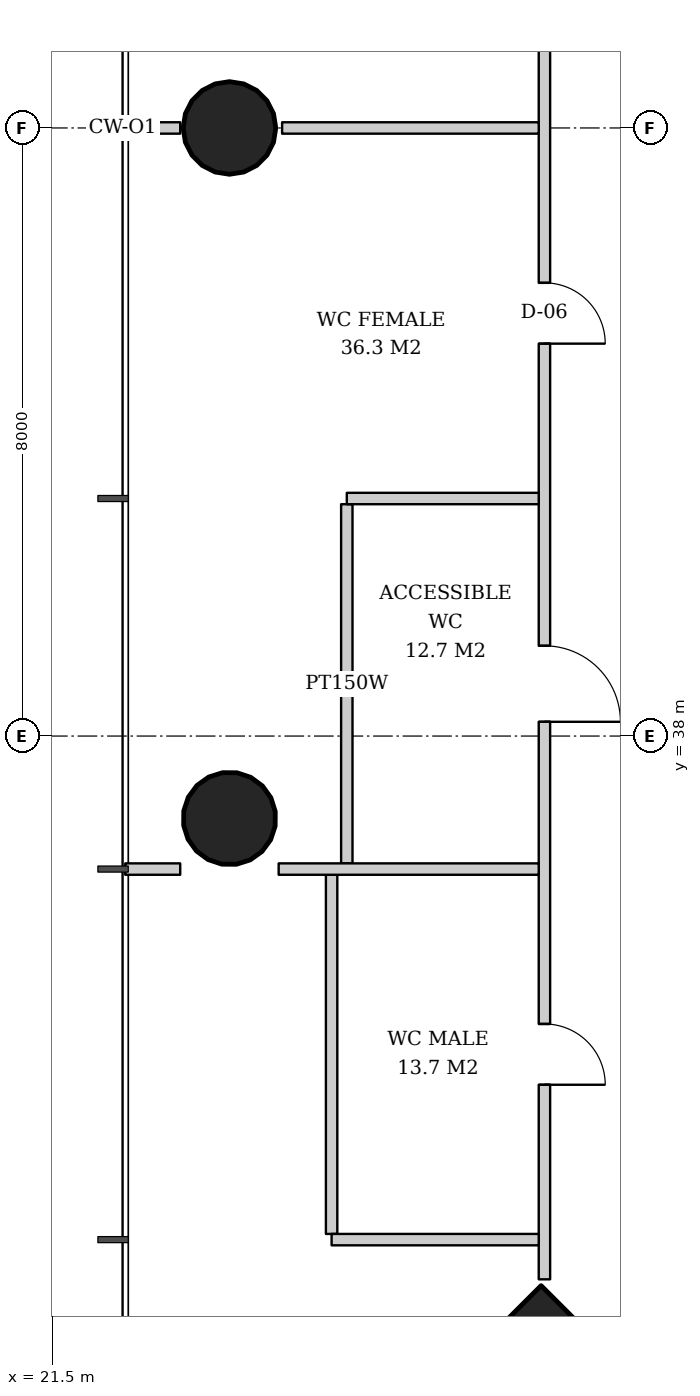
"""IFC4 building model, lengths in metres.
Left out: names, types, materials, properties, quantities, classifications, styles, units other than length and angle.
Written with IfcOpenShell. Run it as: python <this file> out.ifc"""

import sys

from ifc_helpers import new_model, si_unit, direction, frame, frame_2d, origin, origin_2d, place, context, subcontext, project, spatial, rectangle, hollow_circle, extrude, element, fill, save


model = new_model("IFC4")
c1 = context("Model", 3, precision=1e-05, world=origin(), true_north=direction((0.0, 1.0)))
c2 = subcontext(c1, "Body", "Model", "MODEL_VIEW")
j1 = project(units=[si_unit("LENGTHUNIT", "METRE"), si_unit("PLANEANGLEUNIT", "RADIAN")], contexts=[c1])
p1 = place(None, origin())
s1 = spatial("IfcSite", under=j1, at=p1, CompositionType="ELEMENT")
p2 = place(p1, origin())
s2 = spatial("IfcBuilding", under=s1, at=p2, CompositionType="ELEMENT")
p3 = place(p2, frame((0.0, 0.0, 108.4)))
s3 = spatial("IfcBuildingStorey", under=s2, at=p3, CompositionType="ELEMENT", Elevation=108.4)
p4 = place(p3, frame((27.893, 28.893, 0.0), z_axis=(0.031962158256, 0.031962158256, 0.998977898093), x_axis=(-0.707106781187, 0.707106781187, 0.0)))
e1 = element("IfcColumn", 1, at=p4, inside=s3, PredefinedType="COLUMN", context=c2, shape_type="SweptSolid", body=[
    extrude(rectangle(XDim=2.6, YDim=2.6, at=origin_2d()), origin(), (0.0, 0.0, 1.0), 3.804),
])
p5 = place(p3, frame((23.793, 46.0, 0.0), z_axis=(0.031914348339, 0.0, 0.999490607445), x_axis=(0.0, 1.0, 0.0)))
e2 = element("IfcColumn", 2, at=p5, inside=s3, PredefinedType="COLUMN", context=c2, shape_type="SweptSolid", body=[
    extrude(hollow_circle(Radius=0.61, WallThickness=0.04, at=origin_2d()), origin(), (0.0, 0.0, 1.0), 3.802),
])
p6 = place(p3, frame((23.793, 36.896, 0.0), z_axis=(0.031910302246, 0.015923048203, 0.999363892257), x_axis=(-0.446493300058, 0.894786976326, 0.0)))
e3 = element("IfcColumn", 3, at=p6, inside=s3, PredefinedType="COLUMN", context=c2, shape_type="SweptSolid", body=[
    extrude(hollow_circle(Radius=0.61, WallThickness=0.04, at=origin_2d()), origin(), (0.0, 0.0, 1.0), 3.802),
])
p7 = place(p3, frame((25.375, 41.05, 0.0), z_axis=(0.0, 0.0, 1.0), x_axis=(0.0, -1.0, 0.0)))
e4 = element("IfcWall", 4, at=p7, inside=s3, PredefinedType="PARTITIONING", context=c2, shape_type="SweptSolid", body=[
    extrude(rectangle(XDim=4.725, YDim=0.15, at=frame_2d((2.363, 0.0))), origin(), (0.0, 0.0, 1.0), 2.806),
])
p8 = place(p3, frame((25.175, 36.175, 0.0), z_axis=(0.0, 0.0, 1.0), x_axis=(0.0, -1.0, 0.0)))
e5 = element("IfcWall", 5, at=p8, inside=s3, PredefinedType="PARTITIONING", context=c2, shape_type="SweptSolid", body=[
    extrude(rectangle(XDim=4.725, YDim=0.15, at=frame_2d((2.363, 0.0))), origin(), (0.0, 0.0, 1.0), 3.62),
])
p9 = place(p3, frame((27.975, 61.147, 0.0), z_axis=(0.0, 0.0, 1.0), x_axis=(0.0, -1.0, 0.0)))
e6 = element("IfcWall", 6, at=p9, inside=s3, PredefinedType="PARTITIONING", context=c2, shape_type="SweptSolid", body=[
    extrude(rectangle(XDim=30.294, YDim=0.15, at=frame_2d((15.147, 0.0))), origin(), (0.0, 0.0, 1.0), 2.72),
])
p10 = place(p9, frame((2.46, 0.0, 0.0)))
e7 = element("IfcOpeningElement", 7, at=p10, cuts=e6, PredefinedType="OPENING", context=c2, shape_type="SweptSolid", body=[
    extrude(rectangle(XDim=1.0, YDim=2.1, at=frame_2d((0.5, 1.05))), frame((0.0, 0.085, 0.0), z_axis=(0.0, -1.0, 0.0), x_axis=(1.0, 0.0, 0.0)), (0.0, 0.0, 1.0), 0.17),
])
p11 = place(p9, frame((7.335, 0.0, 0.0)))
e8 = element("IfcOpeningElement", 8, at=p11, cuts=e6, PredefinedType="OPENING", context=c2, shape_type="SweptSolid", body=[
    extrude(rectangle(XDim=1.0, YDim=2.1, at=frame_2d((0.5, 1.05))), frame((0.0, 0.085, 0.0), z_axis=(0.0, -1.0, 0.0), x_axis=(1.0, 0.0, 0.0)), (0.0, 0.0, 1.0), 0.17),
])
p12 = place(p9, frame((12.21, 0.0, 0.0)))
e9 = element("IfcOpeningElement", 9, at=p12, cuts=e6, PredefinedType="OPENING", context=c2, shape_type="SweptSolid", body=[
    extrude(rectangle(XDim=1.0, YDim=2.1, at=frame_2d((0.5, 1.05))), frame((0.0, 0.085, 0.0), z_axis=(0.0, -1.0, 0.0), x_axis=(1.0, 0.0, 0.0)), (0.0, 0.0, 1.0), 0.17),
])
p13 = place(p9, frame((17.185, 0.0, 0.0)))
e10 = element("IfcOpeningElement", 10, at=p13, cuts=e6, PredefinedType="OPENING", context=c2, shape_type="SweptSolid", body=[
    extrude(rectangle(XDim=0.8, YDim=2.1, at=frame_2d((0.4, 1.05))), frame((0.0, 0.085, 0.0), z_axis=(0.0, -1.0, 0.0), x_axis=(1.0, 0.0, 0.0)), (0.0, 0.0, 1.0), 0.17),
])
p14 = place(p9, frame((21.96, 0.0, 0.0)))
e11 = element("IfcOpeningElement", 11, at=p14, cuts=e6, PredefinedType="OPENING", context=c2, shape_type="SweptSolid", body=[
    extrude(rectangle(XDim=1.0, YDim=2.1, at=frame_2d((0.5, 1.05))), frame((0.0, 0.085, 0.0), z_axis=(0.0, -1.0, 0.0), x_axis=(1.0, 0.0, 0.0)), (0.0, 0.0, 1.0), 0.17),
])
p15 = place(p9, frame((26.935, 0.0, 0.0)))
e12 = element("IfcOpeningElement", 12, at=p15, cuts=e6, PredefinedType="OPENING", context=c2, shape_type="SweptSolid", body=[
    extrude(rectangle(XDim=0.8, YDim=2.1, at=frame_2d((0.4, 1.05))), frame((0.0, 0.085, 0.0), z_axis=(0.0, -1.0, 0.0), x_axis=(1.0, 0.0, 0.0)), (0.0, 0.0, 1.0), 0.17),
])
p16 = place(p3, frame((27.9, 46.0, 0.0), z_axis=(0.0, 0.0, 1.0), x_axis=(-1.0, 0.0, 0.0)))
e13 = element("IfcWall", 13, at=p16, inside=s3, PredefinedType="PARTITIONING", context=c2, shape_type="SweptSolid", body=[
    extrude(rectangle(XDim=3.376, YDim=0.15, at=frame_2d((1.688, 0.0))), origin(), (0.0, 0.0, 1.0), 2.858),
])
p17 = place(p3, frame((23.183, 46.0, 0.0), z_axis=(0.0, 0.0, 1.0), x_axis=(-1.0, 0.0, 0.0)))
e14 = element("IfcWall", 14, at=p17, inside=s3, PredefinedType="PARTITIONING", context=c2, shape_type="SweptSolid", body=[
    extrude(rectangle(XDim=0.723, YDim=0.15, at=frame_2d((0.362, 0.0))), origin(), (0.0, 0.0, 1.0), 3.62),
])
p18 = place(p3, frame((27.9, 41.125, 0.0), z_axis=(0.0, 0.0, 1.0), x_axis=(-1.0, 0.0, 0.0)))
e15 = element("IfcWall", 15, at=p18, inside=s3, PredefinedType="PARTITIONING", context=c2, shape_type="SweptSolid", body=[
    extrude(rectangle(XDim=2.525, YDim=0.15, at=frame_2d((1.262, 0.0))), origin(), (0.0, 0.0, 1.0), 3.62),
])
p19 = place(p3, frame((27.9, 36.25, 0.0), z_axis=(0.0, 0.0, 1.0), x_axis=(-1.0, 0.0, 0.0)))
e16 = element("IfcWall", 16, at=p19, inside=s3, PredefinedType="PARTITIONING", context=c2, shape_type="SweptSolid", body=[
    extrude(rectangle(XDim=3.421, YDim=0.15, at=frame_2d((1.711, 0.0))), origin(), (0.0, 0.0, 1.0), 3.62),
])
p20 = place(p3, frame((23.183, 36.25, 0.0), z_axis=(0.0, 0.0, 1.0), x_axis=(-1.0, 0.0, 0.0)))
e17 = element("IfcWall", 17, at=p20, inside=s3, PredefinedType="PARTITIONING", context=c2, shape_type="SweptSolid", body=[
    extrude(rectangle(XDim=0.723, YDim=0.15, at=frame_2d((0.362, 0.0))), origin(), (0.0, 0.0, 1.0), 3.62),
])
p21 = place(p3, frame((27.9, 31.375, 0.0), z_axis=(0.0, 0.0, 1.0), x_axis=(-1.0, 0.0, 0.0)))
e18 = element("IfcWall", 18, at=p21, inside=s3, PredefinedType="PARTITIONING", context=c2, shape_type="SweptSolid", body=[
    extrude(rectangle(XDim=2.725, YDim=0.15, at=frame_2d((1.362, 0.0))), origin(), (0.0, 0.0, 1.0), 3.62),
])
p22 = place(p13, origin())
e19 = element("IfcDoor", 19, at=p22, inside=s3, OperationType="SINGLE_SWING_RIGHT", PredefinedType="DOOR", context=c2, shape_type="SweptSolid", body=[
    extrude(rectangle(XDim=0.8, YDim=2.1, at=frame_2d((0.4, 1.05))), frame((0.0, 0.025, 0.0), z_axis=(0.0, -1.0, 0.0), x_axis=(1.0, 0.0, 0.0)), (0.0, 0.0, 1.0), 0.05),
])
fill(e10, e19)
p23 = place(p14, origin())
e20 = element("IfcDoor", 20, at=p23, inside=s3, OperationType="SINGLE_SWING_RIGHT", PredefinedType="DOOR", context=c2, shape_type="SweptSolid", body=[
    extrude(rectangle(XDim=1.0, YDim=2.1, at=frame_2d((0.5, 1.05))), frame((0.0, 0.025, 0.0), z_axis=(0.0, -1.0, 0.0), x_axis=(1.0, 0.0, 0.0)), (0.0, 0.0, 1.0), 0.05),
])
fill(e11, e20)
p24 = place(p15, origin())
e21 = element("IfcDoor", 21, at=p24, inside=s3, OperationType="SINGLE_SWING_RIGHT", PredefinedType="DOOR", context=c2, shape_type="SweptSolid", body=[
    extrude(rectangle(XDim=0.8, YDim=2.1, at=frame_2d((0.4, 1.05))), frame((0.0, 0.025, 0.0), z_axis=(0.0, -1.0, 0.0), x_axis=(1.0, 0.0, 0.0)), (0.0, 0.0, 1.0), 0.05),
])
fill(e12, e21)
save(model, sys.argv[1])
